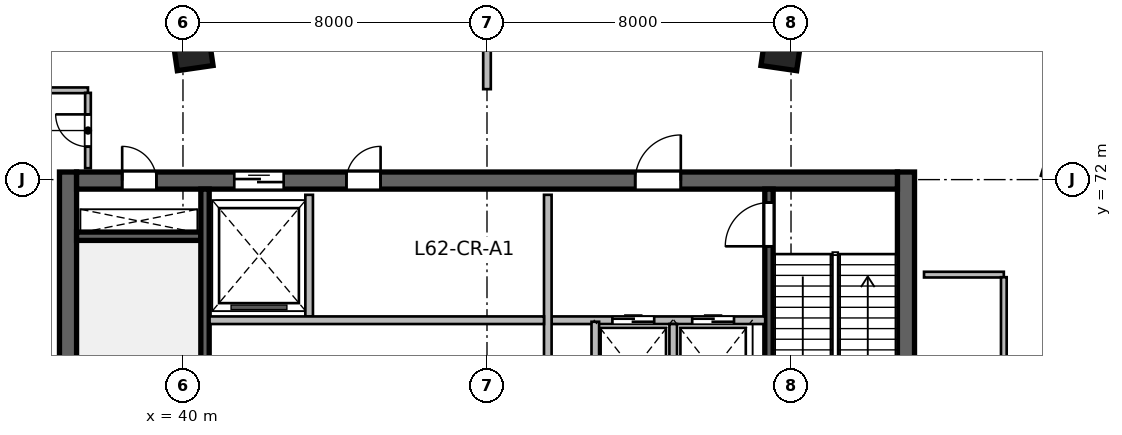
"""IFC4 building model, lengths in metres.
Left out: names, types, materials, properties, quantities, classifications, styles, units other than length and angle.
Written with IfcOpenShell. Run it as: python <this file> out.ifc"""

import sys

from ifc_helpers import new_model, si_unit, direction, frame, frame_2d, origin, origin_2d, place, context, subcontext, project, spatial, rectangle, extrude, source, transform, mapped, element, fill, save


model = new_model("IFC4")
c1 = context("Model", 3, precision=1e-05, world=origin(), true_north=direction((0.0, 1.0)))
c2 = subcontext(c1, "Body", "Model", "MODEL_VIEW")
j1 = project(units=[si_unit("LENGTHUNIT", "METRE"), si_unit("PLANEANGLEUNIT", "RADIAN")], contexts=[c1])
p1 = place(None, origin())
s1 = spatial("IfcSite", under=j1, at=p1, CompositionType="ELEMENT")
p2 = place(p1, origin())
s2 = spatial("IfcBuilding", under=s1, at=p2, CompositionType="ELEMENT")
p3 = place(p2, frame((0.0, 0.0, 254.7)))
s3 = spatial("IfcBuildingStorey", under=s2, at=p3, CompositionType="ELEMENT", Elevation=254.7)
m1 = source(origin(), c2, "Body", "SweptSolid", [
    extrude(rectangle(XDim=12.0, YDim=0.45, at=frame_2d((6.0, 0.0))), origin(), (0.0, 0.0, 1.0), 5.4),
])
for number, where, z_axis, x_axis in (
    (1, (36.975, 60.2, 0.0), (0.0, 0.0, 1.0), (0.0, 1.0, 0.0)),
    (2, (59.025, 60.2, 0.0), (0.0, 0.0, 1.0), (0.0, 1.0, 0.0)),
):
    element("IfcWall", number, at=place(p3, frame(where, z_axis=z_axis, x_axis=x_axis)), inside=s3, PredefinedType="SHEAR", context=c2, shape_type="MappedRepresentation", body=[
        mapped(m1, transform((0.0, 0.0, 0.0), scale=1.0)),
    ])
m2 = source(origin(), c2, "Body", "SweptSolid", [
    extrude(rectangle(XDim=21.6, YDim=0.45, at=frame_2d((10.8, 0.0))), origin(), (0.0, 0.0, 1.0), 5.4),
])
p4 = place(p3, frame((37.2, 71.975, 0.0), z_axis=(0.0, 0.0, 1.0), x_axis=(1.0, 0.0, 0.0)))
e3 = element("IfcWall", 3, at=p4, inside=s3, PredefinedType="SHEAR", context=c2, shape_type="MappedRepresentation", body=[
    mapped(m2, transform((0.0, 0.0, 0.0), scale=1.0)),
])
p5 = place(p4, frame((1.2, 0.0, 0.0)))
e4 = element("IfcOpeningElement", 4, at=p5, cuts=e3, PredefinedType="OPENING", context=c2, shape_type="SweptSolid", body=[
    extrude(rectangle(XDim=0.9, YDim=2.1, at=frame_2d((0.45, 1.05))), frame((0.0, 0.235, 0.0), z_axis=(0.0, -1.0, 0.0), x_axis=(1.0, 0.0, 0.0)), (0.0, 0.0, 1.0), 0.47),
])
p6 = place(p4, frame((14.7, 0.0, 0.0)))
e5 = element("IfcOpeningElement", 5, at=p6, cuts=e3, PredefinedType="OPENING", context=c2, shape_type="SweptSolid", body=[
    extrude(rectangle(XDim=1.2, YDim=2.15, at=frame_2d((0.6, 1.075))), frame((0.0, 0.235, 0.0), z_axis=(0.0, -1.0, 0.0), x_axis=(1.0, 0.0, 0.0)), (0.0, 0.0, 1.0), 0.47),
])
p7 = place(p4, frame((4.15, 0.0, 0.0)))
e6 = element("IfcOpeningElement", 6, at=p7, cuts=e3, PredefinedType="OPENING", context=c2, shape_type="SweptSolid", body=[
    extrude(rectangle(XDim=1.3, YDim=2.15, at=frame_2d((0.65, 1.075))), frame((0.0, 0.235, 0.0), z_axis=(0.0, -1.0, 0.0), x_axis=(1.0, 0.0, 0.0)), (0.0, 0.0, 1.0), 0.47),
])
p8 = place(p4, frame((7.1, 0.0, 0.0)))
e7 = element("IfcOpeningElement", 7, at=p8, cuts=e3, PredefinedType="OPENING", context=c2, shape_type="SweptSolid", body=[
    extrude(rectangle(XDim=0.9, YDim=2.1, at=frame_2d((0.45, 1.05))), frame((0.0, 0.235, 0.0), z_axis=(0.0, -1.0, 0.0), x_axis=(1.0, 0.0, 0.0)), (0.0, 0.0, 1.0), 0.47),
])
m3 = source(origin(), c2, "Body", "SweptSolid", [
    extrude(rectangle(XDim=3.27, YDim=0.22, at=frame_2d((1.635, 0.0))), origin(), (0.0, 0.0, 1.0), 5.4),
])
p9 = place(p3, frame((37.2, 70.51, 0.0), z_axis=(0.0, 0.0, 1.0), x_axis=(1.0, 0.0, 0.0)))
e8 = element("IfcWall", 8, at=p9, inside=s3, PredefinedType="SHEAR", context=c2, shape_type="MappedRepresentation", body=[
    mapped(m3, transform((0.0, 0.0, 0.0), scale=1.0)),
])
m4 = source(origin(), c2, "Body", "SweptSolid", [
    extrude(rectangle(XDim=11.1, YDim=0.22, at=frame_2d((5.55, 0.0))), origin(), (0.0, 0.0, 1.0), 5.4),
])
p10 = place(p3, frame((40.58, 60.65, 0.0), z_axis=(0.0, 0.0, 1.0), x_axis=(0.0, 1.0, 0.0)))
e9 = element("IfcWall", 9, at=p10, inside=s3, PredefinedType="SHEAR", context=c2, shape_type="MappedRepresentation", body=[
    mapped(m4, transform((0.0, 0.0, 0.0), scale=1.0)),
])
p11 = place(p3, frame((55.42, 60.65, 0.0), z_axis=(0.0, 0.0, 1.0), x_axis=(0.0, 1.0, 0.0)))
e10 = element("IfcWall", 10, at=p11, inside=s3, PredefinedType="SHEAR", context=c2, shape_type="MappedRepresentation", body=[
    mapped(m4, transform((0.0, 0.0, 0.0), scale=1.0)),
])
p12 = place(p11, frame((9.595, 0.0, 0.0)))
e11 = element("IfcOpeningElement", 11, at=p12, cuts=e10, PredefinedType="OPENING", context=c2, shape_type="SweptSolid", body=[
    extrude(rectangle(XDim=1.15, YDim=2.15, at=frame_2d((0.575, 1.075))), frame((0.0, 0.12, 0.0), z_axis=(0.0, -1.0, 0.0), x_axis=(1.0, 0.0, 0.0)), (0.0, 0.0, 1.0), 0.24),
])
m5 = source(origin(), c2, "Body", "SweptSolid", [
    extrude(rectangle(XDim=0.95, YDim=0.95, at=origin_2d()), origin(), (0.0, 0.0, 1.0), 5.4),
])
for number, where, z_axis, x_axis in (
    (12, (40.253, 75.404, 0.0), (0.0, 0.0, 1.0), (-0.143, 0.99, 0.0)),
    (13, (55.747, 75.404, 0.0), (0.0, 0.0, 1.0), (0.143, 0.99, 0.0)),
):
    element("IfcColumn", number, at=place(p3, frame(where, z_axis=z_axis, x_axis=x_axis)), inside=s3, PredefinedType="COLUMN", context=c2, shape_type="MappedRepresentation", body=[
        mapped(m5, transform((0.0, 0.0, 0.0), scale=1.0)),
    ])
m6 = source(origin(), c2, "Body", "SweptSolid", [
    extrude(rectangle(XDim=5.62, YDim=0.2, at=frame_2d((2.81, 0.0))), origin(), (0.0, 0.0, 1.0), 5.15),
])
p13 = place(p3, frame((49.7, 68.3, 0.0), z_axis=(0.0, 0.0, 1.0), x_axis=(1.0, 0.0, 0.0)))
e14 = element("IfcWall", 14, at=p13, inside=s3, PredefinedType="SOLIDWALL", context=c2, shape_type="MappedRepresentation", body=[
    mapped(m6, transform((0.0, 0.0, 0.0), scale=1.0)),
])
p14 = place(p13, frame((1.6, 0.0, 0.0)))
e15 = element("IfcOpeningElement", 15, at=p14, cuts=e14, PredefinedType="OPENING", context=c2, shape_type="SweptSolid", body=[
    extrude(rectangle(XDim=1.1, YDim=2.15, at=frame_2d((0.55, 1.075))), frame((0.0, 0.11, 0.0), z_axis=(0.0, -1.0, 0.0), x_axis=(1.0, 0.0, 0.0)), (0.0, 0.0, 1.0), 0.22),
])
p15 = place(p13, frame((3.7, 0.0, 0.0)))
e16 = element("IfcOpeningElement", 16, at=p15, cuts=e14, PredefinedType="OPENING", context=c2, shape_type="SweptSolid", body=[
    extrude(rectangle(XDim=1.1, YDim=2.15, at=frame_2d((0.55, 1.075))), frame((0.0, 0.11, 0.0), z_axis=(0.0, -1.0, 0.0), x_axis=(1.0, 0.0, 0.0)), (0.0, 0.0, 1.0), 0.22),
])
m7 = source(origin(), c2, "Body", "SweptSolid", [
    extrude(rectangle(XDim=5.8, YDim=0.2, at=frame_2d((2.9, 0.0))), origin(), (0.0, 0.0, 1.0), 5.15),
])
p16 = place(p3, frame((49.6, 65.8, 0.0), z_axis=(0.0, 0.0, 1.0), x_axis=(0.0, 1.0, 0.0)))
e17 = element("IfcWall", 17, at=p16, inside=s3, PredefinedType="SOLIDWALL", context=c2, shape_type="MappedRepresentation", body=[
    mapped(m7, transform((0.0, 0.0, 0.0), scale=1.0)),
])
m8 = source(origin(), c2, "Body", "SweptSolid", [
    extrude(rectangle(XDim=2.58, YDim=0.2, at=frame_2d((1.29, 0.0))), origin(), (0.0, 0.0, 1.0), 5.15),
])
p17 = place(p3, frame((50.85, 65.68, 0.0), z_axis=(0.0, 0.0, 1.0), x_axis=(0.0, 1.0, 0.0)))
e18 = element("IfcWall", 18, at=p17, inside=s3, PredefinedType="SOLIDWALL", context=c2, shape_type="MappedRepresentation", body=[
    mapped(m8, transform((0.0, 0.0, 0.0), scale=1.0)),
])
m9 = source(origin(), c2, "Body", "SweptSolid", [
    extrude(rectangle(XDim=2.4, YDim=0.2, at=frame_2d((1.2, 0.0))), origin(), (0.0, 0.0, 1.0), 5.15),
])
p18 = place(p3, frame((52.9, 65.8, 0.0), z_axis=(0.0, 0.0, 1.0), x_axis=(0.0, 1.0, 0.0)))
e19 = element("IfcWall", 19, at=p18, inside=s3, PredefinedType="SOLIDWALL", context=c2, shape_type="MappedRepresentation", body=[
    mapped(m9, transform((0.0, 0.0, 0.0), scale=1.0)),
])
m10 = source(origin(), c2, "Body", "SweptSolid", [
    extrude(rectangle(XDim=3.2, YDim=0.2, at=frame_2d((1.6, 0.0))), origin(), (0.0, 0.0, 1.0), 5.15),
])
p19 = place(p3, frame((43.32, 68.4, 0.0), z_axis=(0.0, 0.0, 1.0), x_axis=(0.0, 1.0, 0.0)))
e20 = element("IfcWall", 20, at=p19, inside=s3, PredefinedType="SOLIDWALL", context=c2, shape_type="MappedRepresentation", body=[
    mapped(m10, transform((0.0, 0.0, 0.0), scale=1.0)),
])
m11 = source(origin(), c2, "Body", "SweptSolid", [
    extrude(rectangle(XDim=8.8, YDim=0.2, at=frame_2d((4.4, 0.0))), origin(), (0.0, 0.0, 1.0), 5.15),
])
p20 = place(p3, frame((40.7, 68.3, 0.0), z_axis=(0.0, 0.0, 1.0), x_axis=(1.0, 0.0, 0.0)))
e21 = element("IfcWall", 21, at=p20, inside=s3, PredefinedType="SOLIDWALL", context=c2, shape_type="MappedRepresentation", body=[
    mapped(m11, transform((0.0, 0.0, 0.0), scale=1.0)),
])
m12 = source(origin(), c2, "Body", "SweptSolid", [
    extrude(rectangle(XDim=3.1, YDim=0.15, at=frame_2d((1.55, 0.0))), origin(), (0.0, 0.0, 1.0), 2.425),
])
p21 = place(p3, frame((34.4, 74.35, 0.0), z_axis=(0.0, 0.0, 1.0), x_axis=(1.0, 0.0, 0.0)))
e22 = element("IfcWall", 22, at=p21, inside=s3, PredefinedType="PARTITIONING", context=c2, shape_type="MappedRepresentation", body=[
    mapped(m12, transform((0.0, 0.0, 0.0), scale=1.0)),
])
m13 = source(origin(), c2, "Body", "SweptSolid", [
    extrude(rectangle(XDim=1.982, YDim=0.15, at=frame_2d((0.991, 0.0))), origin(), (0.0, 0.0, 1.0), 5.15),
])
p22 = place(p3, frame((37.5, 72.3, 0.0), z_axis=(0.0, 0.0, 1.0), x_axis=(0.0, 1.0, 0.0)))
e23 = element("IfcWall", 23, at=p22, inside=s3, PredefinedType="PARTITIONING", context=c2, shape_type="MappedRepresentation", body=[
    mapped(m13, transform((0.0, 0.0, 0.0), scale=1.0)),
])
p23 = place(p22, frame((0.566, 0.0, 0.0)))
e24 = element("IfcOpeningElement", 24, at=p23, cuts=e23, PredefinedType="OPENING", context=c2, shape_type="SweptSolid", body=[
    extrude(rectangle(XDim=0.85, YDim=2.1, at=frame_2d((0.425, 1.05))), frame((0.0, 0.085, 0.0), z_axis=(0.0, -1.0, 0.0), x_axis=(1.0, 0.0, 0.0)), (0.0, 0.0, 1.0), 0.17),
])
m14 = source(origin(), c2, "Body", "SweptSolid", [
    extrude(rectangle(XDim=2.1, YDim=0.15, at=frame_2d((1.05, 0.0))), origin(), (0.0, 0.0, 1.0), 5.15),
])
p24 = place(p3, frame((59.5, 69.5, 0.0), z_axis=(0.0, 0.0, 1.0), x_axis=(1.0, 0.0, 0.0)))
e25 = element("IfcWall", 25, at=p24, inside=s3, PredefinedType="PARTITIONING", context=c2, shape_type="MappedRepresentation", body=[
    mapped(m14, transform((0.0, 0.0, 0.0), scale=1.0)),
])
m15 = source(origin(), c2, "Body", "SweptSolid", [
    extrude(rectangle(XDim=3.565, YDim=0.15, at=frame_2d((1.783, 0.0))), origin(), (0.0, 0.0, 1.0), 5.15),
])
p25 = place(p3, frame((61.6, 65.867, 0.0), z_axis=(0.0, 0.0, 1.0), x_axis=(0.0, 1.0, 0.0)))
e26 = element("IfcWall", 26, at=p25, inside=s3, PredefinedType="PARTITIONING", context=c2, shape_type="MappedRepresentation", body=[
    mapped(m15, transform((0.0, 0.0, 0.0), scale=1.0)),
])
m16 = source(origin(), c2, "Body", "SweptSolid", [
    extrude(rectangle(XDim=5.137, YDim=0.2, at=frame_2d((2.568, 0.0))), origin(), (0.0, 0.0, 1.0), 4.508),
])
p26 = place(p3, frame((48.0, 74.38, 0.0), z_axis=(0.0, 0.0, 1.0), x_axis=(0.0, 1.0, 0.0)))
e27 = element("IfcWall", 27, at=p26, inside=s3, PredefinedType="SOLIDWALL", context=c2, shape_type="MappedRepresentation", body=[
    mapped(m16, transform((0.0, 0.0, 0.0), scale=1.0)),
])
m17 = source(origin(), c2, "Body", "SweptSolid", [
    extrude(rectangle(XDim=0.9, YDim=2.1, at=frame_2d((0.45, 1.05))), frame((0.0, 0.025, 0.0), z_axis=(0.0, -1.0, 0.0), x_axis=(1.0, 0.0, 0.0)), (0.0, 0.0, 1.0), 0.05),
])
p27 = place(p5, origin())
e28 = element("IfcDoor", 28, at=p27, inside=s3, OperationType="SINGLE_SWING_LEFT", PredefinedType="DOOR", context=c2, shape_type="MappedRepresentation", body=[
    mapped(m17, transform((0.0, 0.0, 0.0), scale=1.0)),
])
fill(e4, e28)
m18 = source(origin(), c2, "Body", "SweptSolid", [
    extrude(rectangle(XDim=1.15, YDim=2.15, at=frame_2d((0.575, 1.075))), frame((0.0, 0.025, 0.0), z_axis=(0.0, -1.0, 0.0), x_axis=(1.0, 0.0, 0.0)), (0.0, 0.0, 1.0), 0.05),
])
p28 = place(p12, origin())
e29 = element("IfcDoor", 29, at=p28, inside=s3, OperationType="SINGLE_SWING_LEFT", PredefinedType="DOOR", context=c2, shape_type="MappedRepresentation", body=[
    mapped(m18, transform((0.0, 0.0, 0.0), scale=1.0)),
])
fill(e11, e29)
m19 = source(origin(), c2, "Body", "SweptSolid", [
    extrude(rectangle(XDim=1.2, YDim=2.15, at=frame_2d((0.6, 1.075))), frame((0.0, 0.025, 0.0), z_axis=(0.0, -1.0, 0.0), x_axis=(1.0, 0.0, 0.0)), (0.0, 0.0, 1.0), 0.05),
])
p29 = place(p6, origin())
e30 = element("IfcDoor", 30, at=p29, inside=s3, OperationType="SINGLE_SWING_RIGHT", PredefinedType="DOOR", context=c2, shape_type="MappedRepresentation", body=[
    mapped(m19, transform((0.0, 0.0, 0.0), scale=1.0)),
])
fill(e5, e30)
m20 = source(origin(), c2, "Body", "SweptSolid", [
    extrude(rectangle(XDim=1.1, YDim=2.15, at=frame_2d((0.55, 1.075))), frame((0.0, 0.025, 0.0), z_axis=(0.0, -1.0, 0.0), x_axis=(1.0, 0.0, 0.0)), (0.0, 0.0, 1.0), 0.05),
])
p30 = place(p14, origin())
e31 = element("IfcDoor", 31, at=p30, inside=s3, OperationType="DOUBLE_DOOR_SLIDING", PredefinedType="DOOR", context=c2, shape_type="MappedRepresentation", body=[
    mapped(m20, transform((0.0, 0.0, 0.0), scale=1.0)),
])
fill(e15, e31)
p31 = place(p15, origin())
e32 = element("IfcDoor", 32, at=p31, inside=s3, OperationType="DOUBLE_DOOR_SLIDING", PredefinedType="DOOR", context=c2, shape_type="MappedRepresentation", body=[
    mapped(m20, transform((0.0, 0.0, 0.0), scale=1.0)),
])
fill(e16, e32)
m21 = source(origin(), c2, "Body", "SweptSolid", [
    extrude(rectangle(XDim=1.3, YDim=2.15, at=frame_2d((0.65, 1.075))), frame((0.0, 0.025, 0.0), z_axis=(0.0, -1.0, 0.0), x_axis=(1.0, 0.0, 0.0)), (0.0, 0.0, 1.0), 0.05),
])
p32 = place(p7, origin())
e33 = element("IfcDoor", 33, at=p32, inside=s3, OperationType="DOUBLE_DOOR_SLIDING", PredefinedType="DOOR", context=c2, shape_type="MappedRepresentation", body=[
    mapped(m21, transform((0.0, 0.0, 0.0), scale=1.0)),
])
fill(e6, e33)
p33 = place(p8, origin())
e34 = element("IfcDoor", 34, at=p33, inside=s3, OperationType="SINGLE_SWING_RIGHT", PredefinedType="DOOR", context=c2, shape_type="MappedRepresentation", body=[
    mapped(m17, transform((0.0, 0.0, 0.0), scale=1.0)),
])
fill(e7, e34)
m22 = source(origin(), c2, "Body", "SweptSolid", [
    extrude(rectangle(XDim=0.85, YDim=2.1, at=frame_2d((0.425, 1.05))), frame((0.0, 0.025, 0.0), z_axis=(0.0, -1.0, 0.0), x_axis=(1.0, 0.0, 0.0)), (0.0, 0.0, 1.0), 0.05),
])
p34 = place(p23, origin())
e35 = element("IfcDoor", 35, at=p34, inside=s3, OperationType="SINGLE_SWING_RIGHT", PredefinedType="DOOR", context=c2, shape_type="MappedRepresentation", body=[
    mapped(m22, transform((0.0, 0.0, 0.0), scale=1.0)),
])
fill(e24, e35)
save(model, sys.argv[1])
